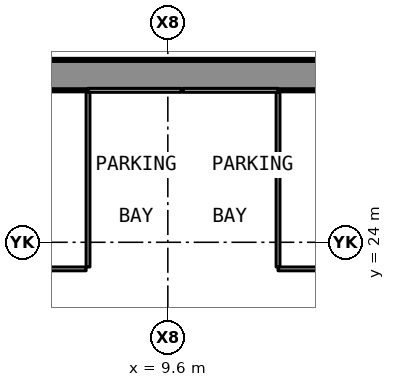
"""IFC4 building model, lengths in metres.
Left out: names, types, materials, properties, quantities, classifications, styles, units other than length and angle.
Written with IfcOpenShell. Run it as: python <this file> out.ifc"""

import sys

from ifc_helpers import new_model, si_unit, direction, frame, frame_2d, origin, place, context, subcontext, project, spatial, rectangle, extrude, element, save


model = new_model("IFC4")
c1 = context("Model", 3, precision=1e-05, world=origin(), true_north=direction((0.0, 1.0)))
c2 = subcontext(c1, "Body", "Model", "MODEL_VIEW")
j1 = project(units=[si_unit("LENGTHUNIT", "METRE"), si_unit("PLANEANGLEUNIT", "RADIAN")], contexts=[c1])
p1 = place(None, origin())
s1 = spatial("IfcSite", under=j1, at=p1, CompositionType="ELEMENT")
p2 = place(p1, origin())
s2 = spatial("IfcBuilding", under=s1, at=p2, CompositionType="ELEMENT")
p3 = place(p2, frame((0.0, 0.0, -10.0)))
s3 = spatial("IfcBuildingStorey", under=s2, at=p3, CompositionType="ELEMENT", Elevation=-10.0)
p4 = place(p3, frame((-37.6, 28.4, -0.6), z_axis=(0.0, 0.0, 1.0), x_axis=(1.0, 0.0, 0.0)))
e1 = element("IfcWall", 1, at=p4, inside=s3, PredefinedType="SOLIDWALL", context=c2, shape_type="SweptSolid", body=[
    extrude(rectangle(XDim=75.2, YDim=0.8, at=frame_2d((37.6, 0.0))), origin(), (0.0, 0.0, 1.0), 5.3),
])
p5 = place(p3, frame((2.5, 23.3, 0.0), z_axis=(0.0, 0.0, 1.0), x_axis=(1.0, 0.0, 0.0)))
e2 = element("IfcWall", 2, at=p5, inside=s3, PredefinedType="PARTITIONING", context=c2, shape_type="SweptSolid", body=[
    extrude(rectangle(XDim=4.95, YDim=0.1, at=frame_2d((2.475, 0.0))), origin(), (0.0, 0.0, 1.0), 4.7),
])
p6 = place(p3, frame((12.5, 23.3, 0.0), z_axis=(0.0, 0.0, 1.0), x_axis=(1.0, 0.0, 0.0)))
e3 = element("IfcWall", 3, at=p6, inside=s3, PredefinedType="PARTITIONING", context=c2, shape_type="SweptSolid", body=[
    extrude(rectangle(XDim=10.0, YDim=0.1, at=frame_2d((5.0, 0.0))), origin(), (0.0, 0.0, 1.0), 4.7),
])
p7 = place(p3, frame((7.5, 28.0, 0.0), z_axis=(0.0, 0.0, 1.0), x_axis=(1.0, 0.0, 0.0)))
e4 = element("IfcWall", 4, at=p7, inside=s3, PredefinedType="PARTITIONING", context=c2, shape_type="SweptSolid", body=[
    extrude(rectangle(XDim=2.45, YDim=0.1, at=frame_2d((1.225, 0.0))), origin(), (0.0, 0.0, 1.0), 4.078),
])
p8 = place(p3, frame((10.0, 28.0, 0.0), z_axis=(0.0, 0.0, 1.0), x_axis=(1.0, 0.0, 0.0)))
e5 = element("IfcWall", 5, at=p8, inside=s3, PredefinedType="PARTITIONING", context=c2, shape_type="SweptSolid", body=[
    extrude(rectangle(XDim=2.5, YDim=0.1, at=frame_2d((1.25, 0.0))), origin(), (0.0, 0.0, 1.0), 4.078),
])
for number, where, z_axis, x_axis in (
    (6, (7.5, 23.35, 0.0), (0.0, 0.0, 1.0), (0.0, 1.0, 0.0)),
    (7, (12.5, 23.35, 0.0), (0.0, 0.0, 1.0), (0.0, 1.0, 0.0)),
):
    element("IfcWall", number, at=place(p3, frame(where, z_axis=z_axis, x_axis=x_axis)), inside=s3, PredefinedType="PARTITIONING", context=c2, shape_type="SweptSolid", body=[
        extrude(rectangle(XDim=4.6, YDim=0.1, at=frame_2d((2.3, 0.0))), origin(), (0.0, 0.0, 1.0), 4.7),
    ])
save(model, sys.argv[1])
